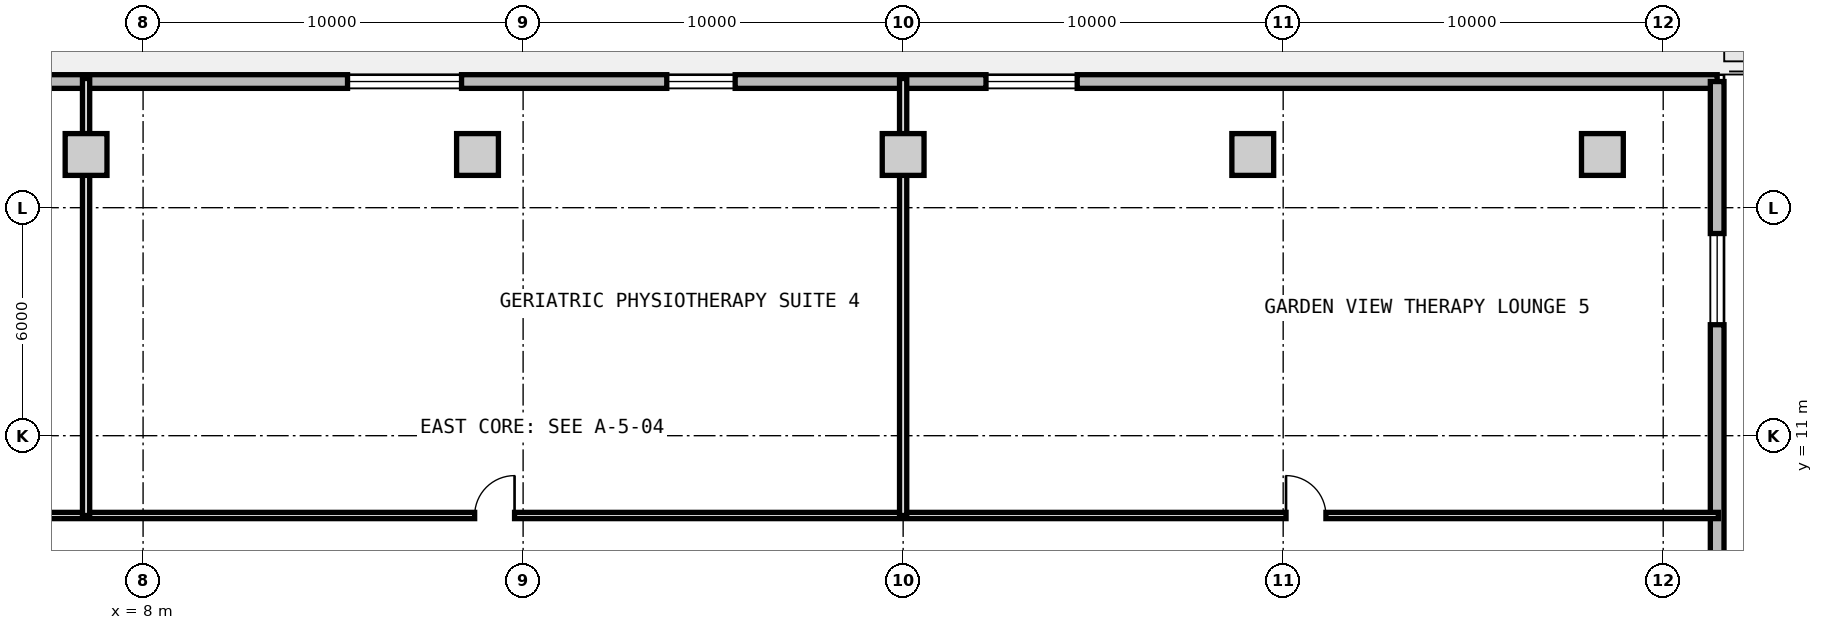
"""IFC4 building model, lengths in metres.
Left out: names, types, materials, properties, quantities, classifications, styles, units other than length and angle.
Written with IfcOpenShell. Run it as: python <this file> out.ifc"""

import sys

from ifc_helpers import new_model, si_unit, direction, frame, frame_2d, origin, origin_2d, place, context, subcontext, project, spatial, rectangle, extrude, source, transform, mapped, element, fill, save


model = new_model("IFC4")
c1 = context("Model", 3, precision=1e-05, world=origin(), true_north=direction((0.0, 1.0)))
c2 = subcontext(c1, "Body", "Model", "MODEL_VIEW")
j1 = project(units=[si_unit("LENGTHUNIT", "METRE"), si_unit("PLANEANGLEUNIT", "RADIAN")], contexts=[c1])
p1 = place(None, origin())
s1 = spatial("IfcSite", under=j1, at=p1, CompositionType="ELEMENT")
p2 = place(p1, origin())
s2 = spatial("IfcBuilding", under=s1, at=p2, CompositionType="ELEMENT")
p3 = place(p2, frame((0.0, 0.0, 12.6)))
s3 = spatial("IfcBuildingStorey", under=s2, at=p3, CompositionType="ELEMENT", Elevation=12.6)
m1 = source(origin(), c2, "Body", "SweptSolid", [
    extrude(rectangle(XDim=1.1, YDim=1.1, at=origin_2d()), origin(), (0.0, 0.0, 1.0), 4.2),
])
for number, where, z_axis, x_axis in (
    (1, (6.5, 18.4, 0.0), (0.0, 0.0, 1.0), (1.0, 0.0, 0.0)),
    (2, (16.8, 18.4, 0.0), (0.0, 0.0, 1.0), (1.0, 0.0, 0.0)),
    (3, (28.0, 18.4, 0.0), (0.0, 0.0, 1.0), (1.0, 0.0, 0.0)),
    (4, (37.2, 18.4, 0.0), (0.0, 0.0, 1.0), (1.0, 0.0, 0.0)),
    (5, (46.4, 18.4, 0.0), (0.0, 0.0, 1.0), (1.0, 0.0, 0.0)),
):
    element("IfcColumn", number, at=place(p3, frame(where, z_axis=z_axis, x_axis=x_axis)), inside=s3, PredefinedType="COLUMN", context=c2, shape_type="MappedRepresentation", body=[
        mapped(m1, transform((0.0, 0.0, 0.0), x_axis=(1.0, 0.0, 0.0), y_axis=(0.0, 1.0, 0.0), z_axis=(0.0, 0.0, 1.0), scale=1.0)),
    ])
m2 = source(origin(), c2, "Body", "SweptSolid", [
    extrude(rectangle(XDim=98.84, YDim=0.36, at=frame_2d((49.42, 0.0))), origin(), (0.0, 0.0, 1.0), 3.88),
])
p4 = place(p3, frame((-49.42, 20.32, 0.0), z_axis=(0.0, 0.0, 1.0), x_axis=(1.0, 0.0, 0.0)))
e6 = element("IfcWall", 6, at=p4, inside=s3, PredefinedType="SOLIDWALL", context=c2, shape_type="MappedRepresentation", body=[
    mapped(m2, transform((0.0, 0.0, 0.0), x_axis=(1.0, 0.0, 0.0), y_axis=(0.0, 1.0, 0.0), z_axis=(0.0, 0.0, 1.0), scale=1.0)),
])
p5 = place(p4, frame((45.92, 0.0, 0.0)))
e7 = element("IfcOpeningElement", 7, at=p5, cuts=e6, PredefinedType="OPENING", context=c2, shape_type="SweptSolid", body=[
    extrude(rectangle(XDim=1.15, YDim=2.25, at=frame_2d((0.575, 1.125))), frame((0.0, 0.19, 0.0), z_axis=(0.0, -1.0, 0.0), x_axis=(1.0, 0.0, 0.0)), (0.0, 0.0, 1.0), 0.38),
])
p6 = place(p4, frame((4.0, 0.0, 0.85)))
e8 = element("IfcOpeningElement", 8, at=p6, cuts=e6, PredefinedType="OPENING", context=c2, shape_type="SweptSolid", body=[
    extrude(rectangle(XDim=2.4, YDim=2.2, at=frame_2d((1.2, 1.1))), frame((0.0, 0.19, 0.0), z_axis=(0.0, -1.0, 0.0), x_axis=(1.0, 0.0, 0.0)), (0.0, 0.0, 1.0), 0.38),
])
p7 = place(p4, frame((12.4, 0.0, 0.85)))
e9 = element("IfcOpeningElement", 9, at=p7, cuts=e6, PredefinedType="OPENING", context=c2, shape_type="SweptSolid", body=[
    extrude(rectangle(XDim=3.0, YDim=2.1, at=frame_2d((1.5, 1.05))), frame((0.0, 0.19, 0.0), z_axis=(0.0, -1.0, 0.0), x_axis=(1.0, 0.0, 0.0)), (0.0, 0.0, 1.0), 0.38),
])
p8 = place(p4, frame((29.2, 0.0, 0.85)))
e10 = element("IfcOpeningElement", 10, at=p8, cuts=e6, PredefinedType="OPENING", context=c2, shape_type="SweptSolid", body=[
    extrude(rectangle(XDim=2.4, YDim=2.2, at=frame_2d((1.2, 1.1))), frame((0.0, 0.19, 0.0), z_axis=(0.0, -1.0, 0.0), x_axis=(1.0, 0.0, 0.0)), (0.0, 0.0, 1.0), 0.38),
])
p9 = place(p4, frame((37.6, 0.0, 0.85)))
e11 = element("IfcOpeningElement", 11, at=p9, cuts=e6, PredefinedType="OPENING", context=c2, shape_type="SweptSolid", body=[
    extrude(rectangle(XDim=3.0, YDim=2.1, at=frame_2d((1.5, 1.05))), frame((0.0, 0.19, 0.0), z_axis=(0.0, -1.0, 0.0), x_axis=(1.0, 0.0, 0.0)), (0.0, 0.0, 1.0), 0.38),
])
p10 = place(p4, frame((62.8, 0.0, 0.85)))
e12 = element("IfcOpeningElement", 12, at=p10, cuts=e6, PredefinedType="OPENING", context=c2, shape_type="SweptSolid", body=[
    extrude(rectangle(XDim=3.0, YDim=2.1, at=frame_2d((1.5, 1.05))), frame((0.0, 0.19, 0.0), z_axis=(0.0, -1.0, 0.0), x_axis=(1.0, 0.0, 0.0)), (0.0, 0.0, 1.0), 0.38),
])
p11 = place(p4, frame((71.2, 0.0, 0.9)))
e13 = element("IfcOpeningElement", 13, at=p11, cuts=e6, PredefinedType="OPENING", context=c2, shape_type="SweptSolid", body=[
    extrude(rectangle(XDim=1.8, YDim=2.0, at=frame_2d((0.9, 1.0))), frame((0.0, 0.19, 0.0), z_axis=(0.0, -1.0, 0.0), x_axis=(1.0, 0.0, 0.0)), (0.0, 0.0, 1.0), 0.38),
])
p12 = place(p4, frame((79.6, 0.0, 0.85)))
e14 = element("IfcOpeningElement", 14, at=p12, cuts=e6, PredefinedType="OPENING", context=c2, shape_type="SweptSolid", body=[
    extrude(rectangle(XDim=2.4, YDim=2.2, at=frame_2d((1.2, 1.1))), frame((0.0, 0.19, 0.0), z_axis=(0.0, -1.0, 0.0), x_axis=(1.0, 0.0, 0.0)), (0.0, 0.0, 1.0), 0.38),
])
m3 = source(origin(), c2, "Body", "SweptSolid", [
    extrude(rectangle(XDim=40.64, YDim=0.36, at=frame_2d((20.32, 0.0))), origin(), (0.0, 0.0, 1.0), 3.88),
])
p13 = place(p3, frame((49.42, 20.32, 0.0), z_axis=(0.0, 0.0, 1.0), x_axis=(0.0, -1.0, 0.0)))
e15 = element("IfcWall", 15, at=p13, inside=s3, PredefinedType="SOLIDWALL", context=c2, shape_type="MappedRepresentation", body=[
    mapped(m3, transform((0.0, 0.0, 0.0), x_axis=(1.0, 0.0, 0.0), y_axis=(0.0, 1.0, 0.0), z_axis=(0.0, 0.0, 1.0), scale=1.0)),
])
p14 = place(p13, frame((4.0, 0.0, 0.85)))
e16 = element("IfcOpeningElement", 16, at=p14, cuts=e15, PredefinedType="OPENING", context=c2, shape_type="SweptSolid", body=[
    extrude(rectangle(XDim=2.4, YDim=2.2, at=frame_2d((1.2, 1.1))), frame((0.0, 0.19, 0.0), z_axis=(0.0, -1.0, 0.0), x_axis=(1.0, 0.0, 0.0)), (0.0, 0.0, 1.0), 0.38),
])
p15 = place(p13, frame((12.4, 0.0, 0.85)))
e17 = element("IfcOpeningElement", 17, at=p15, cuts=e15, PredefinedType="OPENING", context=c2, shape_type="SweptSolid", body=[
    extrude(rectangle(XDim=3.0, YDim=2.1, at=frame_2d((1.5, 1.05))), frame((0.0, 0.19, 0.0), z_axis=(0.0, -1.0, 0.0), x_axis=(1.0, 0.0, 0.0)), (0.0, 0.0, 1.0), 0.38),
])
p16 = place(p13, frame((29.2, 0.0, 0.85)))
e18 = element("IfcOpeningElement", 18, at=p16, cuts=e15, PredefinedType="OPENING", context=c2, shape_type="SweptSolid", body=[
    extrude(rectangle(XDim=2.4, YDim=2.2, at=frame_2d((1.2, 1.1))), frame((0.0, 0.19, 0.0), z_axis=(0.0, -1.0, 0.0), x_axis=(1.0, 0.0, 0.0)), (0.0, 0.0, 1.0), 0.38),
])
m4 = source(origin(), c2, "Body", "SweptSolid", [
    extrude(rectangle(XDim=98.9, YDim=0.165, at=frame_2d((49.45, 0.0))), origin(), (0.0, 0.0, 1.0), 3.865),
])
p17 = place(p3, frame((-49.45, 8.9, 0.0), z_axis=(0.0, 0.0, 1.0), x_axis=(1.0, 0.0, 0.0)))
e19 = element("IfcWall", 19, at=p17, inside=s3, PredefinedType="PARTITIONING", context=c2, shape_type="MappedRepresentation", body=[
    mapped(m4, transform((0.0, 0.0, 0.0), x_axis=(1.0, 0.0, 0.0), y_axis=(0.0, 1.0, 0.0), z_axis=(0.0, 0.0, 1.0), scale=1.0)),
])
p18 = place(p17, frame((10.325, 0.0, 0.0)))
e20 = element("IfcOpeningElement", 20, at=p18, cuts=e19, PredefinedType="OPENING", context=c2, shape_type="SweptSolid", body=[
    extrude(rectangle(XDim=1.05, YDim=2.15, at=frame_2d((0.525, 1.075))), frame((0.0, 0.093, 0.0), z_axis=(0.0, -1.0, 0.0), x_axis=(1.0, 0.0, 0.0)), (0.0, 0.0, 1.0), 0.185),
])
p19 = place(p17, frame((26.525, 0.0, 0.0)))
e21 = element("IfcOpeningElement", 21, at=p19, cuts=e19, PredefinedType="OPENING", context=c2, shape_type="SweptSolid", body=[
    extrude(rectangle(XDim=1.05, YDim=2.15, at=frame_2d((0.525, 1.075))), frame((0.0, 0.093, 0.0), z_axis=(0.0, -1.0, 0.0), x_axis=(1.0, 0.0, 0.0)), (0.0, 0.0, 1.0), 0.185),
])
p20 = place(p17, frame((43.775, 0.0, 0.0)))
e22 = element("IfcOpeningElement", 22, at=p20, cuts=e19, PredefinedType="OPENING", context=c2, shape_type="SweptSolid", body=[
    extrude(rectangle(XDim=1.05, YDim=2.15, at=frame_2d((0.525, 1.075))), frame((0.0, 0.093, 0.0), z_axis=(0.0, -1.0, 0.0), x_axis=(1.0, 0.0, 0.0)), (0.0, 0.0, 1.0), 0.185),
])
p21 = place(p17, frame((66.175, 0.0, 0.0)))
e23 = element("IfcOpeningElement", 23, at=p21, cuts=e19, PredefinedType="OPENING", context=c2, shape_type="SweptSolid", body=[
    extrude(rectangle(XDim=1.05, YDim=2.15, at=frame_2d((0.525, 1.075))), frame((0.0, 0.093, 0.0), z_axis=(0.0, -1.0, 0.0), x_axis=(1.0, 0.0, 0.0)), (0.0, 0.0, 1.0), 0.185),
])
p22 = place(p17, frame((87.525, 0.0, 0.0)))
e24 = element("IfcOpeningElement", 24, at=p22, cuts=e19, PredefinedType="OPENING", context=c2, shape_type="SweptSolid", body=[
    extrude(rectangle(XDim=1.05, YDim=2.15, at=frame_2d((0.525, 1.075))), frame((0.0, 0.093, 0.0), z_axis=(0.0, -1.0, 0.0), x_axis=(1.0, 0.0, 0.0)), (0.0, 0.0, 1.0), 0.185),
])
m5 = source(origin(), c2, "Body", "SweptSolid", [
    extrude(rectangle(XDim=11.5, YDim=0.19, at=frame_2d((5.75, 0.0))), origin(), (0.0, 0.0, 1.0), 3.215),
])
p23 = place(p3, frame((6.5, 8.9, 0.0), z_axis=(0.0, 0.0, 1.0), x_axis=(0.0, 1.0, 0.0)))
e25 = element("IfcWall", 25, at=p23, inside=s3, PredefinedType="PARTITIONING", context=c2, shape_type="MappedRepresentation", body=[
    mapped(m5, transform((0.0, 0.0, 0.0), x_axis=(1.0, 0.0, 0.0), y_axis=(0.0, 1.0, 0.0), z_axis=(0.0, 0.0, 1.0), scale=1.0)),
])
m6 = source(origin(), c2, "Body", "SweptSolid", [
    extrude(rectangle(XDim=11.5, YDim=0.19, at=frame_2d((5.75, 0.0))), origin(), (0.0, 0.0, 1.0), 3.865),
])
p24 = place(p3, frame((28.0, 8.9, 0.0), z_axis=(0.0, 0.0, 1.0), x_axis=(0.0, 1.0, 0.0)))
e26 = element("IfcWall", 26, at=p24, inside=s3, PredefinedType="PARTITIONING", context=c2, shape_type="MappedRepresentation", body=[
    mapped(m6, transform((0.0, 0.0, 0.0), x_axis=(1.0, 0.0, 0.0), y_axis=(0.0, 1.0, 0.0), z_axis=(0.0, 0.0, 1.0), scale=1.0)),
])
m7 = source(origin(), c2, "Body", "SweptSolid", [
    extrude(rectangle(XDim=3.0, YDim=2.1, at=frame_2d((1.5, 1.05))), frame((0.0, 0.03, 0.0), z_axis=(0.0, -1.0, 0.0), x_axis=(1.0, 0.0, 0.0)), (0.0, 0.0, 1.0), 0.06),
])
p25 = place(p10, origin())
e27 = element("IfcWindow", 27, at=p25, inside=s3, PartitioningType="SINGLE_PANEL", PredefinedType="WINDOW", context=c2, shape_type="MappedRepresentation", body=[
    mapped(m7, transform((0.0, 0.0, 0.0), x_axis=(1.0, 0.0, 0.0), y_axis=(0.0, 1.0, 0.0), z_axis=(0.0, 0.0, 1.0), scale=1.0)),
])
fill(e12, e27)
m8 = source(origin(), c2, "Body", "SweptSolid", [
    extrude(rectangle(XDim=1.8, YDim=2.0, at=frame_2d((0.9, 1.0))), frame((0.0, 0.03, 0.0), z_axis=(0.0, -1.0, 0.0), x_axis=(1.0, 0.0, 0.0)), (0.0, 0.0, 1.0), 0.06),
])
p26 = place(p11, origin())
e28 = element("IfcWindow", 28, at=p26, inside=s3, PartitioningType="SINGLE_PANEL", PredefinedType="WINDOW", context=c2, shape_type="MappedRepresentation", body=[
    mapped(m8, transform((0.0, 0.0, 0.0), x_axis=(1.0, 0.0, 0.0), y_axis=(0.0, 1.0, 0.0), z_axis=(0.0, 0.0, 1.0), scale=1.0)),
])
fill(e13, e28)
m9 = source(origin(), c2, "Body", "SweptSolid", [
    extrude(rectangle(XDim=2.4, YDim=2.2, at=frame_2d((1.2, 1.1))), frame((0.0, 0.03, 0.0), z_axis=(0.0, -1.0, 0.0), x_axis=(1.0, 0.0, 0.0)), (0.0, 0.0, 1.0), 0.06),
])
p27 = place(p12, origin())
e29 = element("IfcWindow", 29, at=p27, inside=s3, PartitioningType="SINGLE_PANEL", PredefinedType="WINDOW", context=c2, shape_type="MappedRepresentation", body=[
    mapped(m9, transform((0.0, 0.0, 0.0), x_axis=(1.0, 0.0, 0.0), y_axis=(0.0, 1.0, 0.0), z_axis=(0.0, 0.0, 1.0), scale=1.0)),
])
fill(e14, e29)
p28 = place(p14, origin())
e30 = element("IfcWindow", 30, at=p28, inside=s3, PartitioningType="SINGLE_PANEL", PredefinedType="WINDOW", context=c2, shape_type="MappedRepresentation", body=[
    mapped(m9, transform((0.0, 0.0, 0.0), x_axis=(1.0, 0.0, 0.0), y_axis=(0.0, 1.0, 0.0), z_axis=(0.0, 0.0, 1.0), scale=1.0)),
])
fill(e16, e30)
m10 = source(origin(), c2, "Body", "SweptSolid", [
    extrude(rectangle(XDim=1.05, YDim=2.15, at=frame_2d((0.525, 1.075))), frame((0.0, 0.025, 0.0), z_axis=(0.0, -1.0, 0.0), x_axis=(1.0, 0.0, 0.0)), (0.0, 0.0, 1.0), 0.05),
])
p29 = place(p21, origin())
e31 = element("IfcDoor", 31, at=p29, inside=s3, OperationType="SINGLE_SWING_RIGHT", PredefinedType="DOOR", context=c2, shape_type="MappedRepresentation", body=[
    mapped(m10, transform((0.0, 0.0, 0.0), x_axis=(1.0, 0.0, 0.0), y_axis=(0.0, 1.0, 0.0), z_axis=(0.0, 0.0, 1.0), scale=1.0)),
])
fill(e23, e31)
p30 = place(p22, origin())
e32 = element("IfcDoor", 32, at=p30, inside=s3, OperationType="SINGLE_SWING_LEFT", PredefinedType="DOOR", context=c2, shape_type="MappedRepresentation", body=[
    mapped(m10, transform((0.0, 0.0, 0.0), x_axis=(1.0, 0.0, 0.0), y_axis=(0.0, 1.0, 0.0), z_axis=(0.0, 0.0, 1.0), scale=1.0)),
])
fill(e24, e32)
save(model, sys.argv[1])
